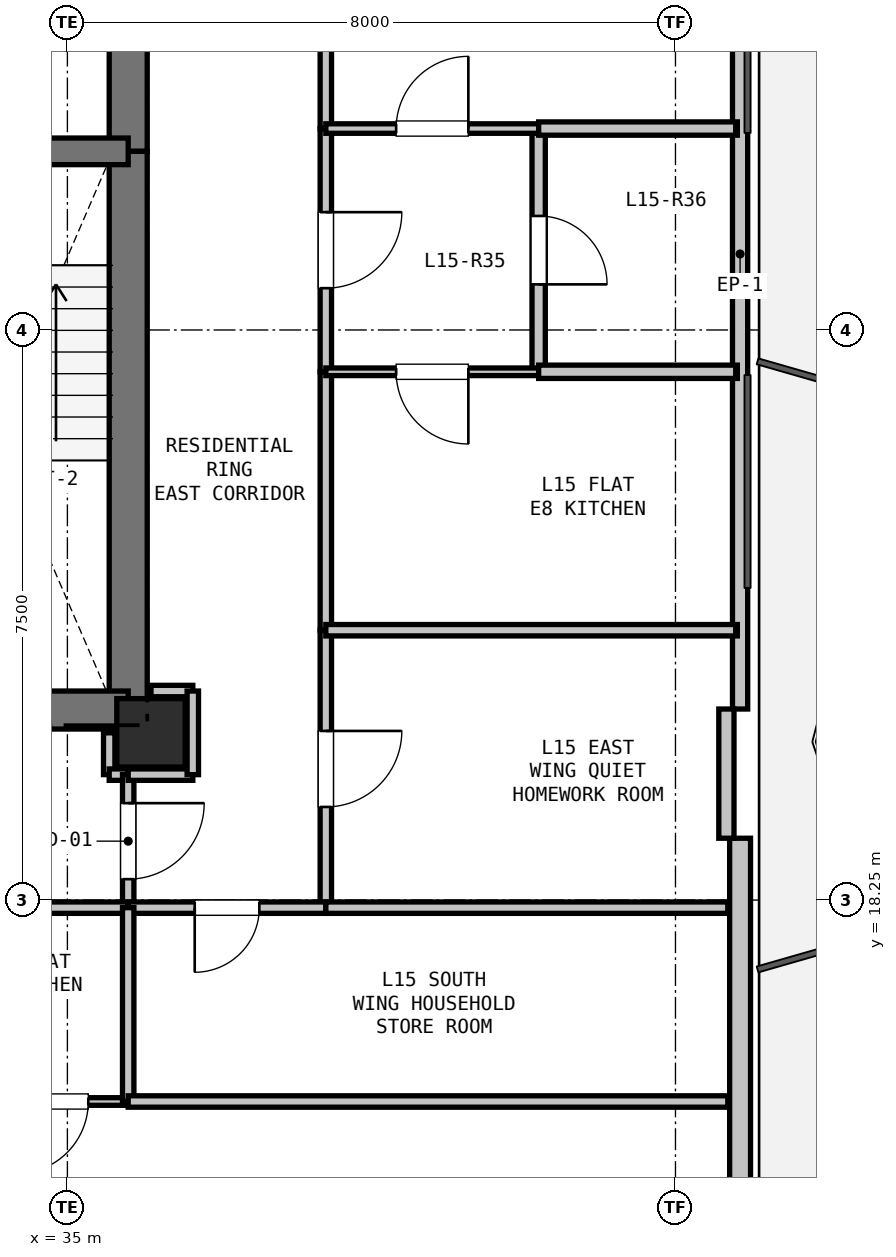
"""IFC4 building model, lengths in metres.
Left out: names, types, materials, properties, quantities, classifications, styles, units other than length and angle.
Written with IfcOpenShell. Run it as: python <this file> out.ifc"""

import sys

from ifc_helpers import new_model, si_unit, direction, frame, frame_2d, origin, origin_2d, place, context, subcontext, project, spatial, rectangle, extrude, element, fill, save


model = new_model("IFC4")
c1 = context("Model", 3, precision=1e-05, world=origin(), true_north=direction((0.0, 1.0)))
c2 = subcontext(c1, "Body", "Model", "MODEL_VIEW")
j1 = project(units=[si_unit("LENGTHUNIT", "METRE"), si_unit("PLANEANGLEUNIT", "RADIAN")], contexts=[c1])
p1 = place(None, origin())
s1 = spatial("IfcSite", under=j1, at=p1, CompositionType="ELEMENT")
p2 = place(p1, origin())
s2 = spatial("IfcBuilding", under=s1, at=p2, CompositionType="ELEMENT")
p3 = place(p2, frame((0.0, 0.0, 55.5)))
s3 = spatial("IfcBuildingStorey", under=s2, at=p3, CompositionType="ELEMENT", Elevation=55.5)
p4 = place(p3, frame((36.1, 20.45, 0.0), z_axis=(0.0, 0.0, 1.0), x_axis=(1.0, 0.0, 0.0)))
e1 = element("IfcColumn", 1, at=p4, inside=s3, PredefinedType="COLUMN", context=c2, shape_type="SweptSolid", body=[
    extrude(rectangle(XDim=0.9, YDim=0.9, at=origin_2d()), origin(), (0.0, 0.0, 1.0), 3.3),
])
p5 = place(p3, frame((43.85, 32.737, 0.0), z_axis=(0.0, 0.0, 1.0), x_axis=(0.0, -1.0, 0.0)))
e2 = element("IfcWall", 2, at=p5, inside=s3, PredefinedType="PARAPET", context=c2, shape_type="SweptSolid", body=[
    extrude(rectangle(XDim=11.973, YDim=0.2, at=frame_2d((5.987, 0.0))), origin(), (0.0, 0.0, 1.0), 0.2),
])
p6 = place(p3, frame((43.85, 19.063, 0.0), z_axis=(0.0, 0.0, 1.0), x_axis=(0.0, -1.0, 0.0)))
e3 = element("IfcWall", 3, at=p6, inside=s3, PredefinedType="SOLIDWALL", context=c2, shape_type="SweptSolid", body=[
    extrude(rectangle(XDim=12.673, YDim=0.275, at=frame_2d((6.336, 0.0))), origin(), (0.0, 0.0, 1.0), 2.66),
])
p7 = place(p3, frame((43.67, 20.763, 0.0), z_axis=(0.0, 0.0, 1.0), x_axis=(0.0, -1.0, 0.0)))
e4 = element("IfcWall", 4, at=p7, inside=s3, PredefinedType="PARAPET", context=c2, shape_type="SweptSolid", body=[
    extrude(rectangle(XDim=1.7, YDim=0.2, at=frame_2d((0.85, 0.0))), origin(), (0.0, 0.0, 1.0), 2.66),
])
p8 = place(p3, frame((35.8, 32.75, 0.0), z_axis=(0.0, 0.0, 1.0), x_axis=(0.0, -1.0, 0.0)))
e5 = element("IfcWall", 5, at=p8, inside=s3, PredefinedType="SHEAR", context=c2, shape_type="SweptSolid", body=[
    extrude(rectangle(XDim=4.65, YDim=0.5, at=frame_2d((2.325, 0.0))), origin(), (0.0, 0.0, 1.0), 3.04),
])
p9 = place(p3, frame((35.8, 28.1, 0.0), z_axis=(0.0, 0.0, 1.0), x_axis=(0.0, -1.0, 0.0)))
e6 = element("IfcWall", 6, at=p9, inside=s3, PredefinedType="SHEAR", context=c2, shape_type="SweptSolid", body=[
    extrude(rectangle(XDim=7.35, YDim=0.5, at=frame_2d((3.675, 0.0))), origin(), (0.0, 0.0, 1.0), 3.04),
])
p10 = place(p3, frame((35.8, 20.75, 0.0), z_axis=(0.0, 0.0, 1.0), x_axis=(-1.0, 0.0, 0.0)))
e7 = element("IfcWall", 7, at=p10, inside=s3, PredefinedType="SHEAR", context=c2, shape_type="SweptSolid", body=[
    extrude(rectangle(XDim=3.45, YDim=0.5, at=frame_2d((1.725, 0.0))), origin(), (0.0, 0.0, 1.0), 3.04),
])
p11 = place(p3, frame((32.35, 28.1, 0.0), z_axis=(0.0, 0.0, 1.0), x_axis=(1.0, 0.0, 0.0)))
e8 = element("IfcWall", 8, at=p11, inside=s3, PredefinedType="SHEAR", context=c2, shape_type="SweptSolid", body=[
    extrude(rectangle(XDim=3.45, YDim=0.35, at=frame_2d((1.725, 0.0))), origin(), (0.0, 0.0, 1.0), 3.04),
])
p12 = place(p11, frame((1.15, 0.0, 0.0)))
e9 = element("IfcOpeningElement", 9, at=p12, cuts=e8, PredefinedType="OPENING", context=c2, shape_type="SweptSolid", body=[
    extrude(rectangle(XDim=1.15, YDim=2.15, at=frame_2d((0.575, 1.075))), frame((0.0, 0.185, 0.0), z_axis=(0.0, -1.0, 0.0), x_axis=(1.0, 0.0, 0.0)), (0.0, 0.0, 1.0), 0.37),
])
p13 = place(p3, frame((35.55, 20.45, 0.0), z_axis=(0.0, 0.0, 1.0), x_axis=(0.0, -1.0, 0.0)))
e10 = element("IfcWall", 10, at=p13, inside=s3, PredefinedType="PARTITIONING", context=c2, shape_type="SweptSolid", body=[
    extrude(rectangle(XDim=0.55, YDim=0.15, at=frame_2d((0.275, 0.0))), origin(), (0.0, 0.0, 1.0), 2.488),
])
p14 = place(p3, frame((35.55, 19.9, 0.0), z_axis=(0.0, 0.0, 1.0), x_axis=(1.0, 0.0, 0.0)))
e11 = element("IfcWall", 11, at=p14, inside=s3, PredefinedType="PARTITIONING", context=c2, shape_type="SweptSolid", body=[
    extrude(rectangle(XDim=0.25, YDim=0.15, at=frame_2d((0.125, 0.0))), origin(), (0.0, 0.0, 1.0), 3.04),
])
p15 = place(p3, frame((35.8, 19.9, 0.0), z_axis=(0.0, 0.0, 1.0), x_axis=(0.0, -1.0, 0.0)))
e12 = element("IfcWall", 12, at=p15, inside=s3, PredefinedType="PARTITIONING", context=c2, shape_type="SweptSolid", body=[
    extrude(rectangle(XDim=1.75, YDim=0.15, at=frame_2d((0.875, 0.0))), origin(), (0.0, 0.0, 1.0), 3.04),
])
p16 = place(p15, frame((0.375, 0.0, 0.0)))
e13 = element("IfcOpeningElement", 13, at=p16, cuts=e12, PredefinedType="OPENING", context=c2, shape_type="SweptSolid", body=[
    extrude(rectangle(XDim=1.0, YDim=2.15, at=frame_2d((0.5, 1.075))), frame((0.0, 0.085, 0.0), z_axis=(0.0, -1.0, 0.0), x_axis=(1.0, 0.0, 0.0)), (0.0, 0.0, 1.0), 0.17),
])
p17 = place(p3, frame((35.8, 18.15, 0.0), z_axis=(0.0, 0.0, 1.0), x_axis=(-1.0, 0.0, 0.0)))
e14 = element("IfcWall", 14, at=p17, inside=s3, PredefinedType="PARTITIONING", context=c2, shape_type="SweptSolid", body=[
    extrude(rectangle(XDim=3.6, YDim=0.15, at=frame_2d((1.8, 0.0))), origin(), (0.0, 0.0, 1.0), 3.04),
])
p18 = place(p3, frame((36.65, 21.0, 0.0), z_axis=(0.0, 0.0, 1.0), x_axis=(-1.0, 0.0, 0.0)))
e15 = element("IfcWall", 15, at=p18, inside=s3, PredefinedType="PARTITIONING", context=c2, shape_type="SweptSolid", body=[
    extrude(rectangle(XDim=0.55, YDim=0.15, at=frame_2d((0.275, 0.0))), origin(), (0.0, 0.0, 1.0), 2.488),
])
p19 = place(p3, frame((38.4, 35.35, 0.0), z_axis=(0.0, 0.0, 1.0), x_axis=(0.0, -1.0, 0.0)))
e16 = element("IfcWall", 16, at=p19, inside=s3, PredefinedType="PARTITIONING", context=c2, shape_type="SweptSolid", body=[
    extrude(rectangle(XDim=6.95, YDim=0.15, at=frame_2d((3.475, 0.0))), origin(), (0.0, 0.0, 1.0), 2.337),
])
p20 = place(p3, frame((38.4, 28.4, 0.0), z_axis=(0.0, 0.0, 1.0), x_axis=(0.0, -1.0, 0.0)))
e17 = element("IfcWall", 17, at=p20, inside=s3, PredefinedType="PARTITIONING", context=c2, shape_type="SweptSolid", body=[
    extrude(rectangle(XDim=3.2, YDim=0.15, at=frame_2d((1.6, 0.0))), origin(), (0.0, 0.0, 1.0), 3.04),
])
p21 = place(p20, frame((1.1, 0.0, 0.0)))
e18 = element("IfcOpeningElement", 18, at=p21, cuts=e17, PredefinedType="OPENING", context=c2, shape_type="SweptSolid", body=[
    extrude(rectangle(XDim=1.0, YDim=2.15, at=frame_2d((0.5, 1.075))), frame((0.0, 0.085, 0.0), z_axis=(0.0, -1.0, 0.0), x_axis=(1.0, 0.0, 0.0)), (0.0, 0.0, 1.0), 0.17),
])
p22 = place(p3, frame((38.4, 25.2, 0.0), z_axis=(0.0, 0.0, 1.0), x_axis=(0.0, -1.0, 0.0)))
e19 = element("IfcWall", 19, at=p22, inside=s3, PredefinedType="PARTITIONING", context=c2, shape_type="SweptSolid", body=[
    extrude(rectangle(XDim=3.4, YDim=0.15, at=frame_2d((1.7, 0.0))), origin(), (0.0, 0.0, 1.0), 3.04),
])
p23 = place(p3, frame((38.4, 21.8, 0.0), z_axis=(0.0, 0.0, 1.0), x_axis=(0.0, -1.0, 0.0)))
e20 = element("IfcWall", 20, at=p23, inside=s3, PredefinedType="PARTITIONING", context=c2, shape_type="SweptSolid", body=[
    extrude(rectangle(XDim=3.65, YDim=0.15, at=frame_2d((1.825, 0.0))), origin(), (0.0, 0.0, 1.0), 3.04),
])
p24 = place(p23, frame((1.325, 0.0, 0.0)))
e21 = element("IfcOpeningElement", 21, at=p24, cuts=e20, PredefinedType="OPENING", context=c2, shape_type="SweptSolid", body=[
    extrude(rectangle(XDim=1.0, YDim=2.15, at=frame_2d((0.5, 1.075))), frame((0.0, 0.085, 0.0), z_axis=(0.0, -1.0, 0.0), x_axis=(1.0, 0.0, 0.0)), (0.0, 0.0, 1.0), 0.17),
])
p25 = place(p3, frame((38.4, 18.15, 0.0), z_axis=(0.0, 0.0, 1.0), x_axis=(-1.0, 0.0, 0.0)))
e22 = element("IfcWall", 22, at=p25, inside=s3, PredefinedType="PARTITIONING", context=c2, shape_type="SweptSolid", body=[
    extrude(rectangle(XDim=2.6, YDim=0.15, at=frame_2d((1.3, 0.0))), origin(), (0.0, 0.0, 1.0), 2.337),
])
p26 = place(p25, frame((0.875, 0.0, 0.0)))
e23 = element("IfcOpeningElement", 23, at=p26, cuts=e22, PredefinedType="OPENING", context=c2, shape_type="SweptSolid", body=[
    extrude(rectangle(XDim=0.85, YDim=2.1, at=frame_2d((0.425, 1.05))), frame((0.0, 0.085, 0.0), z_axis=(0.0, -1.0, 0.0), x_axis=(1.0, 0.0, 0.0)), (0.0, 0.0, 1.0), 0.17),
])
p27 = place(p3, frame((35.8, 19.9, 0.0), z_axis=(0.0, 0.0, 1.0), x_axis=(1.0, 0.0, 0.0)))
e24 = element("IfcWall", 24, at=p27, inside=s3, PredefinedType="PARTITIONING", context=c2, shape_type="SweptSolid", body=[
    extrude(rectangle(XDim=0.85, YDim=0.15, at=frame_2d((0.425, 0.0))), origin(), (0.0, 0.0, 1.0), 2.337),
])
p28 = place(p3, frame((36.65, 19.9, 0.0), z_axis=(0.0, 0.0, 1.0), x_axis=(0.0, 1.0, 0.0)))
e25 = element("IfcWall", 25, at=p28, inside=s3, PredefinedType="PARTITIONING", context=c2, shape_type="SweptSolid", body=[
    extrude(rectangle(XDim=1.1, YDim=0.15, at=frame_2d((0.55, 0.0))), origin(), (0.0, 0.0, 1.0), 3.04),
])
p29 = place(p3, frame((41.2, 28.4, 0.0), z_axis=(0.0, 0.0, 1.0), x_axis=(0.0, -1.0, 0.0)))
e26 = element("IfcWall", 26, at=p29, inside=s3, PredefinedType="PLUMBINGWALL", context=c2, shape_type="SweptSolid", body=[
    extrude(rectangle(XDim=3.2, YDim=0.175, at=frame_2d((1.6, 0.0))), origin(), (0.0, 0.0, 1.0), 3.04),
])
p30 = place(p29, frame((1.15, 0.0, 0.0)))
e27 = element("IfcOpeningElement", 27, at=p30, cuts=e26, PredefinedType="OPENING", context=c2, shape_type="SweptSolid", body=[
    extrude(rectangle(XDim=0.9, YDim=2.1, at=frame_2d((0.45, 1.05))), frame((0.0, 0.097, 0.0), z_axis=(0.0, -1.0, 0.0), x_axis=(1.0, 0.0, 0.0)), (0.0, 0.0, 1.0), 0.195),
])
p31 = place(p3, frame((41.2, 25.2, 0.0), z_axis=(0.0, 0.0, 1.0), x_axis=(-1.0, 0.0, 0.0)))
e28 = element("IfcWall", 28, at=p31, inside=s3, PredefinedType="PARTITIONING", context=c2, shape_type="SweptSolid", body=[
    extrude(rectangle(XDim=2.8, YDim=0.1, at=frame_2d((1.4, 0.0))), origin(), (0.0, 0.0, 1.0), 3.04),
])
p32 = place(p31, frame((0.925, 0.0, 0.0)))
e29 = element("IfcOpeningElement", 29, at=p32, cuts=e28, PredefinedType="OPENING", context=c2, shape_type="SweptSolid", body=[
    extrude(rectangle(XDim=0.95, YDim=2.1, at=frame_2d((0.475, 1.05))), frame((0.0, 0.06, 0.0), z_axis=(0.0, -1.0, 0.0), x_axis=(1.0, 0.0, 0.0)), (0.0, 0.0, 1.0), 0.12),
])
p33 = place(p3, frame((38.4, 28.4, 0.0), z_axis=(0.0, 0.0, 1.0), x_axis=(1.0, 0.0, 0.0)))
e30 = element("IfcWall", 30, at=p33, inside=s3, PredefinedType="PARTITIONING", context=c2, shape_type="SweptSolid", body=[
    extrude(rectangle(XDim=2.8, YDim=0.125, at=frame_2d((1.4, 0.0))), origin(), (0.0, 0.0, 1.0), 3.04),
])
p34 = place(p33, frame((0.925, 0.0, 0.0)))
e31 = element("IfcOpeningElement", 31, at=p34, cuts=e30, PredefinedType="OPENING", context=c2, shape_type="SweptSolid", body=[
    extrude(rectangle(XDim=0.95, YDim=2.1, at=frame_2d((0.475, 1.05))), frame((0.0, 0.073, 0.0), z_axis=(0.0, -1.0, 0.0), x_axis=(1.0, 0.0, 0.0)), (0.0, 0.0, 1.0), 0.145),
])
p35 = place(p3, frame((35.8, 15.6, 0.0), z_axis=(0.0, 0.0, 1.0), x_axis=(-1.0, 0.0, 0.0)))
e32 = element("IfcWall", 32, at=p35, inside=s3, PredefinedType="PARTITIONING", context=c2, shape_type="SweptSolid", body=[
    extrude(rectangle(XDim=2.0, YDim=0.1, at=frame_2d((1.0, 0.0))), origin(), (0.0, 0.0, 1.0), 3.04),
])
p36 = place(p35, frame((0.525, 0.0, 0.0)))
e33 = element("IfcOpeningElement", 33, at=p36, cuts=e32, PredefinedType="OPENING", context=c2, shape_type="SweptSolid", body=[
    extrude(rectangle(XDim=0.95, YDim=2.1, at=frame_2d((0.475, 1.05))), frame((0.0, 0.06, 0.0), z_axis=(0.0, -1.0, 0.0), x_axis=(1.0, 0.0, 0.0)), (0.0, 0.0, 1.0), 0.12),
])
p37 = place(p3, frame((35.8, 18.15, 0.0), z_axis=(0.0, 0.0, 1.0), x_axis=(0.0, -1.0, 0.0)))
e34 = element("IfcWall", 34, at=p37, inside=s3, PredefinedType="PARTITIONING", context=c2, shape_type="SweptSolid", body=[
    extrude(rectangle(XDim=2.55, YDim=0.15, at=frame_2d((1.275, 0.0))), origin(), (0.0, 0.0, 1.0), 3.04),
])
for number, where, z_axis, x_axis in (
    (35, (41.2, 28.4, 0.0), (0.0, 0.0, 1.0), (1.0, 0.0, 0.0)),
    (36, (43.814, 25.2, 0.0), (0.0, 0.0, 1.0), (-1.0, 0.0, 0.0)),
):
    element("IfcWall", number, at=place(p3, frame(where, z_axis=z_axis, x_axis=x_axis)), inside=s3, PredefinedType="PLUMBINGWALL", context=c2, shape_type="SweptSolid", body=[
        extrude(rectangle(XDim=2.614, YDim=0.175, at=frame_2d((1.307, 0.0))), origin(), (0.0, 0.0, 1.0), 2.365),
    ])
p38 = place(p3, frame((43.814, 21.8, 0.0), z_axis=(0.0, 0.0, 1.0), x_axis=(-1.0, 0.0, 0.0)))
e37 = element("IfcWall", 37, at=p38, inside=s3, PredefinedType="PARTITIONING", context=c2, shape_type="SweptSolid", body=[
    extrude(rectangle(XDim=5.414, YDim=0.15, at=frame_2d((2.707, 0.0))), origin(), (0.0, 0.0, 1.0), 2.365),
])
p39 = place(p3, frame((38.4, 18.15, 0.0), z_axis=(0.0, 0.0, 1.0), x_axis=(1.0, 0.0, 0.0)))
e38 = element("IfcWall", 38, at=p39, inside=s3, PredefinedType="PARTITIONING", context=c2, shape_type="SweptSolid", body=[
    extrude(rectangle(XDim=5.289, YDim=0.15, at=frame_2d((2.644, 0.0))), origin(), (0.0, 0.0, 1.0), 2.365),
])
p40 = place(p3, frame((43.688, 15.6, 0.0), z_axis=(0.0, 0.0, 1.0), x_axis=(-1.0, 0.0, 0.0)))
e39 = element("IfcWall", 39, at=p40, inside=s3, PredefinedType="PARTITIONING", context=c2, shape_type="SweptSolid", body=[
    extrude(rectangle(XDim=7.888, YDim=0.15, at=frame_2d((3.944, 0.0))), origin(), (0.0, 0.0, 1.0), 2.337),
])
p41 = place(p16, origin())
e40 = element("IfcDoor", 40, at=p41, inside=s3, OperationType="SINGLE_SWING_LEFT", PredefinedType="DOOR", context=c2, shape_type="SweptSolid", body=[
    extrude(rectangle(XDim=1.0, YDim=2.15, at=frame_2d((0.5, 1.075))), frame((0.0, 0.025, 0.0), z_axis=(0.0, -1.0, 0.0), x_axis=(1.0, 0.0, 0.0)), (0.0, 0.0, 1.0), 0.05),
])
fill(e13, e40)
p42 = place(p21, origin())
e41 = element("IfcDoor", 41, at=p42, inside=s3, OperationType="SINGLE_SWING_LEFT", PredefinedType="DOOR", context=c2, shape_type="SweptSolid", body=[
    extrude(rectangle(XDim=1.0, YDim=2.15, at=frame_2d((0.5, 1.075))), frame((0.0, 0.025, 0.0), z_axis=(0.0, -1.0, 0.0), x_axis=(1.0, 0.0, 0.0)), (0.0, 0.0, 1.0), 0.05),
])
fill(e18, e41)
p43 = place(p26, origin())
e42 = element("IfcDoor", 42, at=p43, inside=s3, OperationType="SINGLE_SWING_RIGHT", PredefinedType="DOOR", context=c2, shape_type="SweptSolid", body=[
    extrude(rectangle(XDim=0.85, YDim=2.1, at=frame_2d((0.425, 1.05))), frame((0.0, 0.025, 0.0), z_axis=(0.0, -1.0, 0.0), x_axis=(1.0, 0.0, 0.0)), (0.0, 0.0, 1.0), 0.05),
])
fill(e23, e42)
p44 = place(p24, origin())
e43 = element("IfcDoor", 43, at=p44, inside=s3, OperationType="SINGLE_SWING_LEFT", PredefinedType="DOOR", context=c2, shape_type="SweptSolid", body=[
    extrude(rectangle(XDim=1.0, YDim=2.15, at=frame_2d((0.5, 1.075))), frame((0.0, 0.025, 0.0), z_axis=(0.0, -1.0, 0.0), x_axis=(1.0, 0.0, 0.0)), (0.0, 0.0, 1.0), 0.05),
])
fill(e21, e43)
p45 = place(p30, origin())
e44 = element("IfcDoor", 44, at=p45, inside=s3, OperationType="SINGLE_SWING_RIGHT", PredefinedType="DOOR", context=c2, shape_type="SweptSolid", body=[
    extrude(rectangle(XDim=0.9, YDim=2.1, at=frame_2d((0.45, 1.05))), frame((0.0, 0.025, 0.0), z_axis=(0.0, -1.0, 0.0), x_axis=(1.0, 0.0, 0.0)), (0.0, 0.0, 1.0), 0.05),
])
fill(e27, e44)
p46 = place(p32, origin())
e45 = element("IfcDoor", 45, at=p46, inside=s3, OperationType="SINGLE_SWING_LEFT", PredefinedType="DOOR", context=c2, shape_type="SweptSolid", body=[
    extrude(rectangle(XDim=0.95, YDim=2.1, at=frame_2d((0.475, 1.05))), frame((0.0, 0.025, 0.0), z_axis=(0.0, -1.0, 0.0), x_axis=(1.0, 0.0, 0.0)), (0.0, 0.0, 1.0), 0.05),
])
fill(e29, e45)
p47 = place(p34, origin())
e46 = element("IfcDoor", 46, at=p47, inside=s3, OperationType="SINGLE_SWING_RIGHT", PredefinedType="DOOR", context=c2, shape_type="SweptSolid", body=[
    extrude(rectangle(XDim=0.95, YDim=2.1, at=frame_2d((0.475, 1.05))), frame((0.0, 0.025, 0.0), z_axis=(0.0, -1.0, 0.0), x_axis=(1.0, 0.0, 0.0)), (0.0, 0.0, 1.0), 0.05),
])
fill(e31, e46)
p48 = place(p36, origin())
e47 = element("IfcDoor", 47, at=p48, inside=s3, OperationType="SINGLE_SWING_RIGHT", PredefinedType="DOOR", context=c2, shape_type="SweptSolid", body=[
    extrude(rectangle(XDim=0.95, YDim=2.1, at=frame_2d((0.475, 1.05))), frame((0.0, 0.025, 0.0), z_axis=(0.0, -1.0, 0.0), x_axis=(1.0, 0.0, 0.0)), (0.0, 0.0, 1.0), 0.05),
])
fill(e33, e47)
save(model, sys.argv[1])
